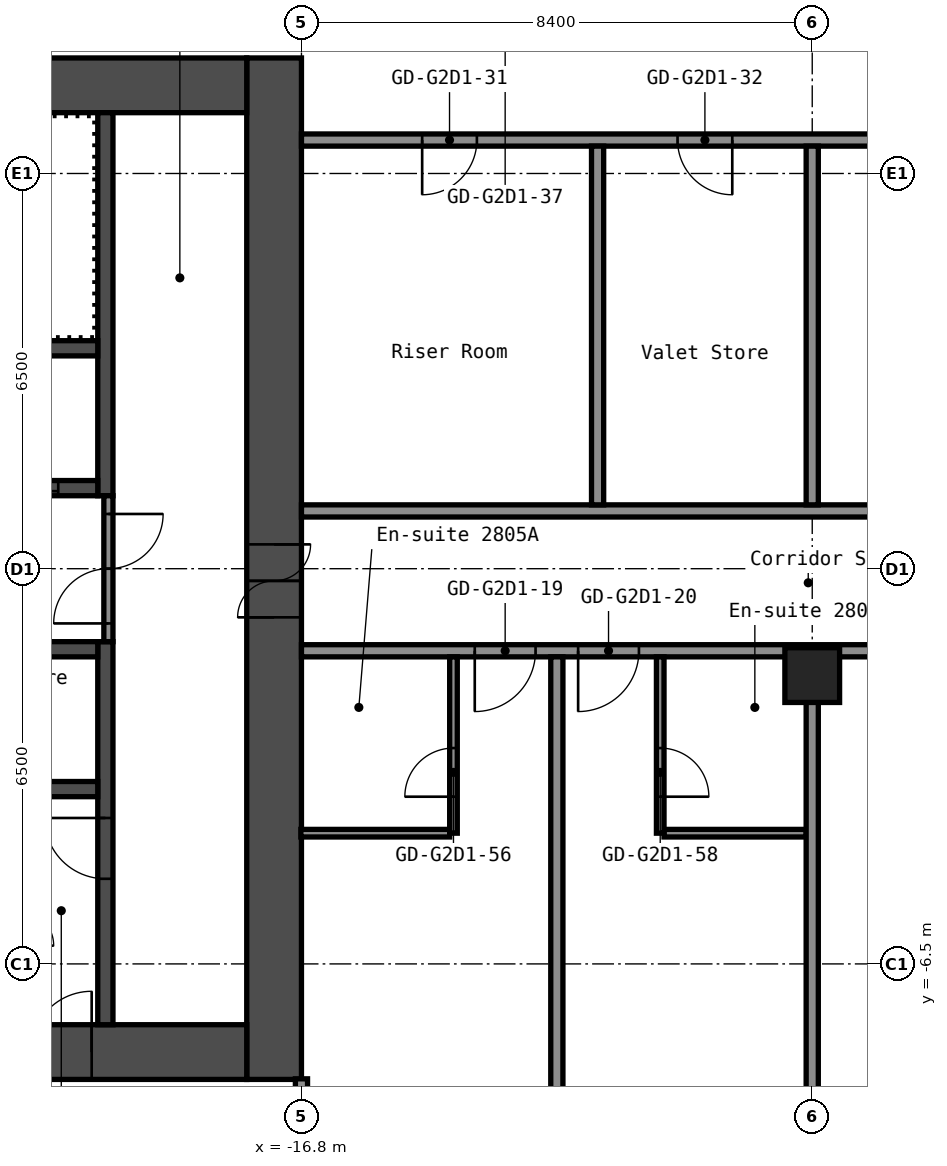
"""IFC4 building model, lengths in metres.
Left out: names, types, materials, properties, quantities, classifications, styles, units other than length and angle.
Written with IfcOpenShell. Run it as: python <this file> out.ifc"""

import sys

from ifc_helpers import new_model, si_unit, direction, frame, frame_2d, origin, origin_2d, place, context, subcontext, project, spatial, rectangle, hollow_rectangle, extrude, element, fill, save


model = new_model("IFC4")
c1 = context("Model", 3, precision=1e-05, world=origin(), true_north=direction((0.0, 1.0)))
c2 = subcontext(c1, "Body", "Model", "MODEL_VIEW")
j1 = project(units=[si_unit("LENGTHUNIT", "METRE"), si_unit("PLANEANGLEUNIT", "RADIAN")], contexts=[c1])
p1 = place(None, origin())
s1 = spatial("IfcSite", under=j1, at=p1, CompositionType="ELEMENT")
p2 = place(p1, origin())
s2 = spatial("IfcBuilding", under=s1, at=p2, CompositionType="ELEMENT")
p3 = place(p2, frame((0.0, 0.0, 101.0)))
s3 = spatial("IfcBuildingStorey", under=s2, at=p3, CompositionType="ELEMENT", Elevation=101.0)
p4 = place(p3, frame((-8.4, -1.75, 0.0), z_axis=(0.0, 0.0, 1.0), x_axis=(1.0, 0.0, 0.0)))
e1 = element("IfcColumn", 1, at=p4, inside=s3, PredefinedType="COLUMN", context=c2, shape_type="SweptSolid", body=[
    extrude(hollow_rectangle(XDim=0.9, YDim=0.9, WallThickness=0.036, at=origin_2d()), origin(), (0.0, 0.0, 1.0), 2.8),
])
p5 = place(p3, frame((-17.25, -8.4, 0.0), z_axis=(0.0, 0.0, 1.0), x_axis=(0.0, 1.0, 0.0)))
e2 = element("IfcWall", 2, at=p5, inside=s3, PredefinedType="SHEAR", context=c2, shape_type="SweptSolid", body=[
    extrude(rectangle(XDim=16.8, YDim=0.9, at=frame_2d((8.4, 0.0))), origin(), (0.0, 0.0, 1.0), 2.8),
])
p6 = place(p5, frame((7.6, 0.0, 0.0)))
e3 = element("IfcOpeningElement", 3, at=p6, cuts=e2, PredefinedType="OPENING", context=c2, shape_type="SweptSolid", body=[
    extrude(rectangle(XDim=1.2, YDim=2.1, at=frame_2d((0.6, 1.05))), frame((0.0, 0.46, 0.0), z_axis=(0.0, -1.0, 0.0), x_axis=(1.0, 0.0, 0.0)), (0.0, 0.0, 1.0), 0.92),
])
p7 = place(p3, frame((-32.7, 7.95, 0.0), z_axis=(0.0, 0.0, 1.0), x_axis=(1.0, 0.0, 0.0)))
e4 = element("IfcWall", 4, at=p7, inside=s3, PredefinedType="SHEAR", context=c2, shape_type="SweptSolid", body=[
    extrude(rectangle(XDim=15.0, YDim=0.9, at=frame_2d((7.5, 0.0))), origin(), (0.0, 0.0, 1.0), 2.8),
])
p8 = place(p7, frame((3.4, 0.0, 0.0)))
e5 = element("IfcOpeningElement", 5, at=p8, cuts=e4, PredefinedType="OPENING", context=c2, shape_type="SweptSolid", body=[
    extrude(rectangle(XDim=1.2, YDim=2.1, at=frame_2d((0.6, 1.05))), frame((0.0, 0.46, 0.0), z_axis=(0.0, -1.0, 0.0), x_axis=(1.0, 0.0, 0.0)), (0.0, 0.0, 1.0), 0.92),
])
p9 = place(p7, frame((0.75, 0.0, 0.0)))
e6 = element("IfcOpeningElement", 6, at=p9, cuts=e4, PredefinedType="OPENING", context=c2, shape_type="SweptSolid", body=[
    extrude(rectangle(XDim=0.9, YDim=2.1, at=frame_2d((0.45, 1.05))), frame((0.0, 0.46, 0.0), z_axis=(0.0, -1.0, 0.0), x_axis=(1.0, 0.0, 0.0)), (0.0, 0.0, 1.0), 0.92),
])
p10 = place(p3, frame((-32.7, -7.95, 0.0), z_axis=(0.0, 0.0, 1.0), x_axis=(1.0, 0.0, 0.0)))
e7 = element("IfcWall", 7, at=p10, inside=s3, PredefinedType="SHEAR", context=c2, shape_type="SweptSolid", body=[
    extrude(rectangle(XDim=15.0, YDim=0.9, at=frame_2d((7.5, 0.0))), origin(), (0.0, 0.0, 1.0), 2.8),
])
p11 = place(p10, frame((11.45, 0.0, 0.0)))
e8 = element("IfcOpeningElement", 8, at=p11, cuts=e7, PredefinedType="OPENING", context=c2, shape_type="SweptSolid", body=[
    extrude(rectangle(XDim=1.0, YDim=2.1, at=frame_2d((0.5, 1.05))), frame((0.0, 0.46, 0.0), z_axis=(0.0, -1.0, 0.0), x_axis=(1.0, 0.0, 0.0)), (0.0, 0.0, 1.0), 0.92),
])
p12 = place(p3, frame((-20.025, 1.2, 0.0), z_axis=(0.0, 0.0, 1.0), x_axis=(0.0, 1.0, 0.0)))
e9 = element("IfcWall", 9, at=p12, inside=s3, PredefinedType="SHEAR", context=c2, shape_type="SweptSolid", body=[
    extrude(rectangle(XDim=6.3, YDim=0.25, at=frame_2d((3.15, 0.0))), origin(), (0.0, 0.0, 1.0), 2.8),
])
p13 = place(p3, frame((-20.025, -7.5, 0.0), z_axis=(0.0, 0.0, 1.0), x_axis=(0.0, 1.0, 0.0)))
e10 = element("IfcWall", 10, at=p13, inside=s3, PredefinedType="SHEAR", context=c2, shape_type="SweptSolid", body=[
    extrude(rectangle(XDim=6.3, YDim=0.25, at=frame_2d((3.15, 0.0))), origin(), (0.0, 0.0, 1.0), 2.8),
])
p14 = place(p13, frame((2.4, 0.0, 0.0)))
e11 = element("IfcOpeningElement", 11, at=p14, cuts=e10, PredefinedType="OPENING", context=c2, shape_type="SweptSolid", body=[
    extrude(rectangle(XDim=1.0, YDim=2.1, at=frame_2d((0.5, 1.05))), frame((0.0, 0.135, 0.0), z_axis=(0.0, -1.0, 0.0), x_axis=(1.0, 0.0, 0.0)), (0.0, 0.0, 1.0), 0.27),
])
p15 = place(p3, frame((-27.65, 1.325, 0.0), z_axis=(0.0, 0.0, 1.0), x_axis=(1.0, 0.0, 0.0)))
e12 = element("IfcWall", 12, at=p15, inside=s3, PredefinedType="SHEAR", context=c2, shape_type="SweptSolid", body=[
    extrude(rectangle(XDim=7.5, YDim=0.25, at=frame_2d((3.75, 0.0))), origin(), (0.0, 0.0, 1.0), 2.8),
])
p16 = place(p15, frame((5.75, 0.0, 0.0)))
e13 = element("IfcOpeningElement", 13, at=p16, cuts=e12, PredefinedType="OPENING", context=c2, shape_type="SweptSolid", body=[
    extrude(rectangle(XDim=1.1, YDim=2.1, at=frame_2d((0.55, 1.05))), frame((0.0, 0.135, 0.0), z_axis=(0.0, -1.0, 0.0), x_axis=(1.0, 0.0, 0.0)), (0.0, 0.0, 1.0), 0.27),
])
p17 = place(p15, frame((3.35, 0.0, 0.0)))
e14 = element("IfcOpeningElement", 14, at=p17, cuts=e12, PredefinedType="OPENING", context=c2, shape_type="SweptSolid", body=[
    extrude(rectangle(XDim=1.1, YDim=2.1, at=frame_2d((0.55, 1.05))), frame((0.0, 0.135, 0.0), z_axis=(0.0, -1.0, 0.0), x_axis=(1.0, 0.0, 0.0)), (0.0, 0.0, 1.0), 0.27),
])
p18 = place(p15, frame((0.95, 0.0, 0.0)))
e15 = element("IfcOpeningElement", 15, at=p18, cuts=e12, PredefinedType="OPENING", context=c2, shape_type="SweptSolid", body=[
    extrude(rectangle(XDim=1.1, YDim=2.1, at=frame_2d((0.55, 1.05))), frame((0.0, 0.135, 0.0), z_axis=(0.0, -1.0, 0.0), x_axis=(1.0, 0.0, 0.0)), (0.0, 0.0, 1.0), 0.27),
])
for number, where, z_axis, x_axis in (
    (16, (-27.65, 3.625, 0.0), (0.0, 0.0, 1.0), (1.0, 0.0, 0.0)),
    (17, (-27.65, -1.325, 0.0), (0.0, 0.0, 1.0), (1.0, 0.0, 0.0)),
    (18, (-27.65, -3.625, 0.0), (0.0, 0.0, 1.0), (1.0, 0.0, 0.0)),
):
    element("IfcWall", number, at=place(p3, frame(where, z_axis=z_axis, x_axis=x_axis)), inside=s3, PredefinedType="SHEAR", context=c2, shape_type="SweptSolid", body=[
        extrude(rectangle(XDim=7.5, YDim=0.25, at=frame_2d((3.75, 0.0))), origin(), (0.0, 0.0, 1.0), 2.8),
    ])
p19 = place(p3, frame((-19.975, -1.2, 0.0), z_axis=(0.0, 0.0, 1.0), x_axis=(0.0, 1.0, 0.0)))
e19 = element("IfcWall", 19, at=p19, inside=s3, PredefinedType="PARTITIONING", context=c2, shape_type="SweptSolid", body=[
    extrude(rectangle(XDim=2.4, YDim=0.15, at=frame_2d((1.2, 0.0))), origin(), (0.0, 0.0, 1.0), 2.8),
])
p20 = place(p19, frame((0.3, 0.0, 0.0)))
e20 = element("IfcOpeningElement", 20, at=p20, cuts=e19, PredefinedType="OPENING", context=c2, shape_type="SweptSolid", body=[
    extrude(rectangle(XDim=1.8, YDim=2.1, at=frame_2d((0.9, 1.05))), frame((0.0, 0.085, 0.0), z_axis=(0.0, -1.0, 0.0), x_axis=(1.0, 0.0, 0.0)), (0.0, 0.0, 1.0), 0.17),
])
p21 = place(p3, frame((-16.81, -4.35, 0.0), z_axis=(0.0, 0.0, 1.0), x_axis=(1.0, 0.0, 0.0)))
e21 = element("IfcWall", 21, at=p21, inside=s3, PredefinedType="PARTITIONING", context=c2, shape_type="SweptSolid", body=[
    extrude(rectangle(XDim=2.448, YDim=0.125, at=frame_2d((1.224, 0.0))), origin(), (0.0, 0.0, 1.0), 2.8),
])
p22 = place(p3, frame((-10.837, -4.35, 0.0), z_axis=(0.0, 0.0, 1.0), x_axis=(1.0, 0.0, 0.0)))
e22 = element("IfcWall", 22, at=p22, inside=s3, PredefinedType="PARTITIONING", context=c2, shape_type="SweptSolid", body=[
    extrude(rectangle(XDim=2.337, YDim=0.125, at=frame_2d((1.169, 0.0))), origin(), (0.0, 0.0, 1.0), 2.8),
])
p23 = place(p3, frame((-16.8, -1.35, 0.0), z_axis=(0.0, 0.0, 1.0), x_axis=(1.0, 0.0, 0.0)))
e23 = element("IfcWall", 23, at=p23, inside=s3, PredefinedType="PARTITIONING", context=c2, shape_type="SweptSolid", body=[
    extrude(rectangle(XDim=33.6, YDim=0.2, at=frame_2d((16.8, 0.0))), origin(), (0.0, 0.0, 1.0), 2.8),
])
p24 = place(p23, frame((2.85, 0.0, 0.0)))
e24 = element("IfcOpeningElement", 24, at=p24, cuts=e23, PredefinedType="OPENING", context=c2, shape_type="SweptSolid", body=[
    extrude(rectangle(XDim=1.0, YDim=2.1, at=frame_2d((0.5, 1.05))), frame((0.0, 0.11, 0.0), z_axis=(0.0, -1.0, 0.0), x_axis=(1.0, 0.0, 0.0)), (0.0, 0.0, 1.0), 0.22),
])
p25 = place(p23, frame((4.55, 0.0, 0.0)))
e25 = element("IfcOpeningElement", 25, at=p25, cuts=e23, PredefinedType="OPENING", context=c2, shape_type="SweptSolid", body=[
    extrude(rectangle(XDim=1.0, YDim=2.1, at=frame_2d((0.5, 1.05))), frame((0.0, 0.11, 0.0), z_axis=(0.0, -1.0, 0.0), x_axis=(1.0, 0.0, 0.0)), (0.0, 0.0, 1.0), 0.22),
])
p26 = place(p23, frame((12.1, 0.0, 0.0)))
e26 = element("IfcOpeningElement", 26, at=p26, cuts=e23, PredefinedType="OPENING", context=c2, shape_type="SweptSolid", body=[
    extrude(rectangle(XDim=1.0, YDim=2.1, at=frame_2d((0.5, 1.05))), frame((0.0, 0.11, 0.0), z_axis=(0.0, -1.0, 0.0), x_axis=(1.0, 0.0, 0.0)), (0.0, 0.0, 1.0), 0.22),
])
p27 = place(p23, frame((19.65, 0.0, 0.0)))
e27 = element("IfcOpeningElement", 27, at=p27, cuts=e23, PredefinedType="OPENING", context=c2, shape_type="SweptSolid", body=[
    extrude(rectangle(XDim=1.0, YDim=2.1, at=frame_2d((0.5, 1.05))), frame((0.0, 0.11, 0.0), z_axis=(0.0, -1.0, 0.0), x_axis=(1.0, 0.0, 0.0)), (0.0, 0.0, 1.0), 0.22),
])
p28 = place(p23, frame((21.35, 0.0, 0.0)))
e28 = element("IfcOpeningElement", 28, at=p28, cuts=e23, PredefinedType="OPENING", context=c2, shape_type="SweptSolid", body=[
    extrude(rectangle(XDim=1.0, YDim=2.1, at=frame_2d((0.5, 1.05))), frame((0.0, 0.11, 0.0), z_axis=(0.0, -1.0, 0.0), x_axis=(1.0, 0.0, 0.0)), (0.0, 0.0, 1.0), 0.22),
])
p29 = place(p23, frame((30.6, 0.0, 0.0)))
e29 = element("IfcOpeningElement", 29, at=p29, cuts=e23, PredefinedType="OPENING", context=c2, shape_type="SweptSolid", body=[
    extrude(rectangle(XDim=1.0, YDim=2.1, at=frame_2d((0.5, 1.05))), frame((0.0, 0.11, 0.0), z_axis=(0.0, -1.0, 0.0), x_axis=(1.0, 0.0, 0.0)), (0.0, 0.0, 1.0), 0.22),
])
p30 = place(p3, frame((-16.8, 0.95, 0.0), z_axis=(0.0, 0.0, 1.0), x_axis=(1.0, 0.0, 0.0)))
e30 = element("IfcWall", 30, at=p30, inside=s3, PredefinedType="PARTITIONING", context=c2, shape_type="SweptSolid", body=[
    extrude(rectangle(XDim=33.6, YDim=0.2, at=frame_2d((16.8, 0.0))), origin(), (0.0, 0.0, 1.0), 2.8),
])
p31 = place(p30, frame((10.47, 0.0, 0.0)))
e31 = element("IfcOpeningElement", 31, at=p31, cuts=e30, PredefinedType="OPENING", context=c2, shape_type="SweptSolid", body=[
    extrude(rectangle(XDim=0.9, YDim=2.1, at=frame_2d((0.45, 1.05))), frame((0.0, 0.11, 0.0), z_axis=(0.0, -1.0, 0.0), x_axis=(1.0, 0.0, 0.0)), (0.0, 0.0, 1.0), 0.22),
])
p32 = place(p30, frame((14.67, 0.0, 0.0)))
e32 = element("IfcOpeningElement", 32, at=p32, cuts=e30, PredefinedType="OPENING", context=c2, shape_type="SweptSolid", body=[
    extrude(rectangle(XDim=0.9, YDim=2.1, at=frame_2d((0.45, 1.05))), frame((0.0, 0.11, 0.0), z_axis=(0.0, -1.0, 0.0), x_axis=(1.0, 0.0, 0.0)), (0.0, 0.0, 1.0), 0.22),
])
p33 = place(p30, frame((27.1, 0.0, 0.0)))
e33 = element("IfcOpeningElement", 33, at=p33, cuts=e30, PredefinedType="OPENING", context=c2, shape_type="SweptSolid", body=[
    extrude(rectangle(XDim=0.9, YDim=2.1, at=frame_2d((0.45, 1.05))), frame((0.0, 0.11, 0.0), z_axis=(0.0, -1.0, 0.0), x_axis=(1.0, 0.0, 0.0)), (0.0, 0.0, 1.0), 0.22),
])
p34 = place(p30, frame((31.3, 0.0, 0.0)))
e34 = element("IfcOpeningElement", 34, at=p34, cuts=e30, PredefinedType="OPENING", context=c2, shape_type="SweptSolid", body=[
    extrude(rectangle(XDim=0.9, YDim=2.1, at=frame_2d((0.45, 1.05))), frame((0.0, 0.11, 0.0), z_axis=(0.0, -1.0, 0.0), x_axis=(1.0, 0.0, 0.0)), (0.0, 0.0, 1.0), 0.22),
])
p35 = place(p3, frame((-16.8, 7.05, 0.0), z_axis=(0.0, 0.0, 1.0), x_axis=(1.0, 0.0, 0.0)))
e35 = element("IfcWall", 35, at=p35, inside=s3, PredefinedType="PARTITIONING", context=c2, shape_type="SweptSolid", body=[
    extrude(rectangle(XDim=33.6, YDim=0.2, at=frame_2d((16.8, 0.0))), origin(), (0.0, 0.0, 1.0), 2.8),
])
p36 = place(p35, frame((1.985, 0.0, 0.0)))
e36 = element("IfcOpeningElement", 36, at=p36, cuts=e35, PredefinedType="OPENING", context=c2, shape_type="SweptSolid", body=[
    extrude(rectangle(XDim=0.9, YDim=2.1, at=frame_2d((0.45, 1.05))), frame((0.0, 0.11, 0.0), z_axis=(0.0, -1.0, 0.0), x_axis=(1.0, 0.0, 0.0)), (0.0, 0.0, 1.0), 0.22),
])
p37 = place(p35, frame((6.185, 0.0, 0.0)))
e37 = element("IfcOpeningElement", 37, at=p37, cuts=e35, PredefinedType="OPENING", context=c2, shape_type="SweptSolid", body=[
    extrude(rectangle(XDim=0.9, YDim=2.1, at=frame_2d((0.45, 1.05))), frame((0.0, 0.11, 0.0), z_axis=(0.0, -1.0, 0.0), x_axis=(1.0, 0.0, 0.0)), (0.0, 0.0, 1.0), 0.22),
])
p38 = place(p35, frame((18.115, 0.0, 0.0)))
e38 = element("IfcOpeningElement", 38, at=p38, cuts=e35, PredefinedType="OPENING", context=c2, shape_type="SweptSolid", body=[
    extrude(rectangle(XDim=0.9, YDim=2.1, at=frame_2d((0.45, 1.05))), frame((0.0, 0.11, 0.0), z_axis=(0.0, -1.0, 0.0), x_axis=(1.0, 0.0, 0.0)), (0.0, 0.0, 1.0), 0.22),
])
p39 = place(p35, frame((22.315, 0.0, 0.0)))
e39 = element("IfcOpeningElement", 39, at=p39, cuts=e35, PredefinedType="OPENING", context=c2, shape_type="SweptSolid", body=[
    extrude(rectangle(XDim=0.9, YDim=2.1, at=frame_2d((0.45, 1.05))), frame((0.0, 0.11, 0.0), z_axis=(0.0, -1.0, 0.0), x_axis=(1.0, 0.0, 0.0)), (0.0, 0.0, 1.0), 0.22),
])
p40 = place(p3, frame((-16.8, -15.55, 0.0), z_axis=(0.0, 0.0, 1.0), x_axis=(0.0, 1.0, 0.0)))
e40 = element("IfcWall", 40, at=p40, inside=s3, PredefinedType="PARTITIONING", context=c2, shape_type="SweptSolid", body=[
    extrude(rectangle(XDim=7.16, YDim=0.2, at=frame_2d((3.58, 0.0))), origin(), (0.0, 0.0, 1.0), 2.8),
])
p41 = place(p3, frame((-14.3, -4.35, 0.0), z_axis=(0.0, 0.0, 1.0), x_axis=(0.0, 1.0, 0.0)))
e41 = element("IfcWall", 41, at=p41, inside=s3, PredefinedType="PARTITIONING", context=c2, shape_type="SweptSolid", body=[
    extrude(rectangle(XDim=2.9, YDim=0.125, at=frame_2d((1.45, 0.0))), origin(), (0.0, 0.0, 1.0), 2.8),
])
p42 = place(p41, frame((0.6, 0.0, 0.0)))
e42 = element("IfcOpeningElement", 42, at=p42, cuts=e41, PredefinedType="OPENING", context=c2, shape_type="SweptSolid", body=[
    extrude(rectangle(XDim=0.8, YDim=2.1, at=frame_2d((0.4, 1.05))), frame((0.0, 0.073, 0.0), z_axis=(0.0, -1.0, 0.0), x_axis=(1.0, 0.0, 0.0)), (0.0, 0.0, 1.0), 0.145),
])
p43 = place(p3, frame((-12.6, -15.55, 0.0), z_axis=(0.0, 0.0, 1.0), x_axis=(0.0, 1.0, 0.0)))
e43 = element("IfcWall", 43, at=p43, inside=s3, PredefinedType="PARTITIONING", context=c2, shape_type="SweptSolid", body=[
    extrude(rectangle(XDim=14.1, YDim=0.2, at=frame_2d((7.05, 0.0))), origin(), (0.0, 0.0, 1.0), 2.8),
])
p44 = place(p3, frame((-11.93, 1.05, 0.0), z_axis=(0.0, 0.0, 1.0), x_axis=(0.0, 1.0, 0.0)))
e44 = element("IfcWall", 44, at=p44, inside=s3, PredefinedType="PARTITIONING", context=c2, shape_type="SweptSolid", body=[
    extrude(rectangle(XDim=5.9, YDim=0.2, at=frame_2d((2.95, 0.0))), origin(), (0.0, 0.0, 1.0), 2.8),
])
p45 = place(p3, frame((-10.9, -4.35, 0.0), z_axis=(0.0, 0.0, 1.0), x_axis=(0.0, 1.0, 0.0)))
e45 = element("IfcWall", 45, at=p45, inside=s3, PredefinedType="PARTITIONING", context=c2, shape_type="SweptSolid", body=[
    extrude(rectangle(XDim=2.9, YDim=0.125, at=frame_2d((1.45, 0.0))), origin(), (0.0, 0.0, 1.0), 2.8),
])
p46 = place(p45, frame((0.6, 0.0, 0.0)))
e46 = element("IfcOpeningElement", 46, at=p46, cuts=e45, PredefinedType="OPENING", context=c2, shape_type="SweptSolid", body=[
    extrude(rectangle(XDim=0.8, YDim=2.1, at=frame_2d((0.4, 1.05))), frame((0.0, 0.073, 0.0), z_axis=(0.0, -1.0, 0.0), x_axis=(1.0, 0.0, 0.0)), (0.0, 0.0, 1.0), 0.145),
])
p47 = place(p3, frame((-8.4, -15.55, 0.0), z_axis=(0.0, 0.0, 1.0), x_axis=(0.0, 1.0, 0.0)))
e47 = element("IfcWall", 47, at=p47, inside=s3, PredefinedType="PARTITIONING", context=c2, shape_type="SweptSolid", body=[
    extrude(rectangle(XDim=13.36, YDim=0.2, at=frame_2d((6.68, 0.0))), origin(), (0.0, 0.0, 1.0), 2.8),
])
p48 = place(p3, frame((-8.4, 1.05, 0.0), z_axis=(0.0, 0.0, 1.0), x_axis=(0.0, 1.0, 0.0)))
e48 = element("IfcWall", 48, at=p48, inside=s3, PredefinedType="PARTITIONING", context=c2, shape_type="SweptSolid", body=[
    extrude(rectangle(XDim=5.9, YDim=0.2, at=frame_2d((2.95, 0.0))), origin(), (0.0, 0.0, 1.0), 2.8),
])
p49 = place(p6, origin())
e49 = element("IfcDoor", 49, at=p49, inside=s3, OperationType="DOUBLE_DOOR_SINGLE_SWING", PredefinedType="DOOR", context=c2, shape_type="SweptSolid", body=[
    extrude(rectangle(XDim=1.2, YDim=2.1, at=frame_2d((0.6, 1.05))), frame((0.0, 0.025, 0.0), z_axis=(0.0, -1.0, 0.0), x_axis=(1.0, 0.0, 0.0)), (0.0, 0.0, 1.0), 0.05),
])
fill(e3, e49)
p50 = place(p11, origin())
e50 = element("IfcDoor", 50, at=p50, inside=s3, OperationType="SINGLE_SWING_LEFT", PredefinedType="DOOR", context=c2, shape_type="SweptSolid", body=[
    extrude(rectangle(XDim=1.0, YDim=2.1, at=frame_2d((0.5, 1.05))), frame((0.0, 0.025, 0.0), z_axis=(0.0, -1.0, 0.0), x_axis=(1.0, 0.0, 0.0)), (0.0, 0.0, 1.0), 0.05),
])
fill(e8, e50)
p51 = place(p14, origin())
e51 = element("IfcDoor", 51, at=p51, inside=s3, OperationType="SINGLE_SWING_LEFT", PredefinedType="DOOR", context=c2, shape_type="SweptSolid", body=[
    extrude(rectangle(XDim=1.0, YDim=2.1, at=frame_2d((0.5, 1.05))), frame((0.0, 0.025, 0.0), z_axis=(0.0, -1.0, 0.0), x_axis=(1.0, 0.0, 0.0)), (0.0, 0.0, 1.0), 0.05),
])
fill(e11, e51)
p52 = place(p20, origin())
e52 = element("IfcDoor", 52, at=p52, inside=s3, OperationType="DOUBLE_DOOR_SINGLE_SWING", PredefinedType="DOOR", context=c2, shape_type="SweptSolid", body=[
    extrude(rectangle(XDim=1.8, YDim=2.1, at=frame_2d((0.9, 1.05))), frame((0.0, 0.025, 0.0), z_axis=(0.0, -1.0, 0.0), x_axis=(1.0, 0.0, 0.0)), (0.0, 0.0, 1.0), 0.05),
])
fill(e20, e52)
p53 = place(p16, origin())
e53 = element("IfcDoor", 53, at=p53, inside=s3, OperationType="DOUBLE_DOOR_SLIDING", PredefinedType="DOOR", context=c2, shape_type="SweptSolid", body=[
    extrude(rectangle(XDim=1.1, YDim=2.1, at=frame_2d((0.55, 1.05))), frame((0.0, 0.025, 0.0), z_axis=(0.0, -1.0, 0.0), x_axis=(1.0, 0.0, 0.0)), (0.0, 0.0, 1.0), 0.05),
])
fill(e13, e53)
p54 = place(p24, origin())
e54 = element("IfcDoor", 54, at=p54, inside=s3, OperationType="SINGLE_SWING_LEFT", PredefinedType="DOOR", context=c2, shape_type="SweptSolid", body=[
    extrude(rectangle(XDim=1.0, YDim=2.1, at=frame_2d((0.5, 1.05))), frame((0.0, 0.025, 0.0), z_axis=(0.0, -1.0, 0.0), x_axis=(1.0, 0.0, 0.0)), (0.0, 0.0, 1.0), 0.05),
])
fill(e24, e54)
p55 = place(p25, origin())
e55 = element("IfcDoor", 55, at=p55, inside=s3, OperationType="SINGLE_SWING_LEFT", PredefinedType="DOOR", context=c2, shape_type="SweptSolid", body=[
    extrude(rectangle(XDim=1.0, YDim=2.1, at=frame_2d((0.5, 1.05))), frame((0.0, 0.025, 0.0), z_axis=(0.0, -1.0, 0.0), x_axis=(1.0, 0.0, 0.0)), (0.0, 0.0, 1.0), 0.05),
])
fill(e25, e55)
p56 = place(p36, origin())
e56 = element("IfcDoor", 56, at=p56, inside=s3, OperationType="SINGLE_SWING_LEFT", PredefinedType="DOOR", context=c2, shape_type="SweptSolid", body=[
    extrude(rectangle(XDim=0.9, YDim=2.1, at=frame_2d((0.45, 1.05))), frame((0.0, 0.025, 0.0), z_axis=(0.0, -1.0, 0.0), x_axis=(1.0, 0.0, 0.0)), (0.0, 0.0, 1.0), 0.05),
])
fill(e36, e56)
p57 = place(p37, origin())
e57 = element("IfcDoor", 57, at=p57, inside=s3, OperationType="SINGLE_SWING_RIGHT", PredefinedType="DOOR", context=c2, shape_type="SweptSolid", body=[
    extrude(rectangle(XDim=0.9, YDim=2.1, at=frame_2d((0.45, 1.05))), frame((0.0, 0.025, 0.0), z_axis=(0.0, -1.0, 0.0), x_axis=(1.0, 0.0, 0.0)), (0.0, 0.0, 1.0), 0.05),
])
fill(e37, e57)
p58 = place(p42, origin())
e58 = element("IfcDoor", 58, at=p58, inside=s3, OperationType="SINGLE_SWING_RIGHT", PredefinedType="DOOR", context=c2, shape_type="SweptSolid", body=[
    extrude(rectangle(XDim=0.8, YDim=2.1, at=frame_2d((0.4, 1.05))), frame((0.0, 0.025, 0.0), z_axis=(0.0, -1.0, 0.0), x_axis=(1.0, 0.0, 0.0)), (0.0, 0.0, 1.0), 0.05),
])
fill(e42, e58)
p59 = place(p46, origin())
e59 = element("IfcDoor", 59, at=p59, inside=s3, OperationType="SINGLE_SWING_LEFT", PredefinedType="DOOR", context=c2, shape_type="SweptSolid", body=[
    extrude(rectangle(XDim=0.8, YDim=2.1, at=frame_2d((0.4, 1.05))), frame((0.0, 0.025, 0.0), z_axis=(0.0, -1.0, 0.0), x_axis=(1.0, 0.0, 0.0)), (0.0, 0.0, 1.0), 0.05),
])
fill(e46, e59)
save(model, sys.argv[1])
